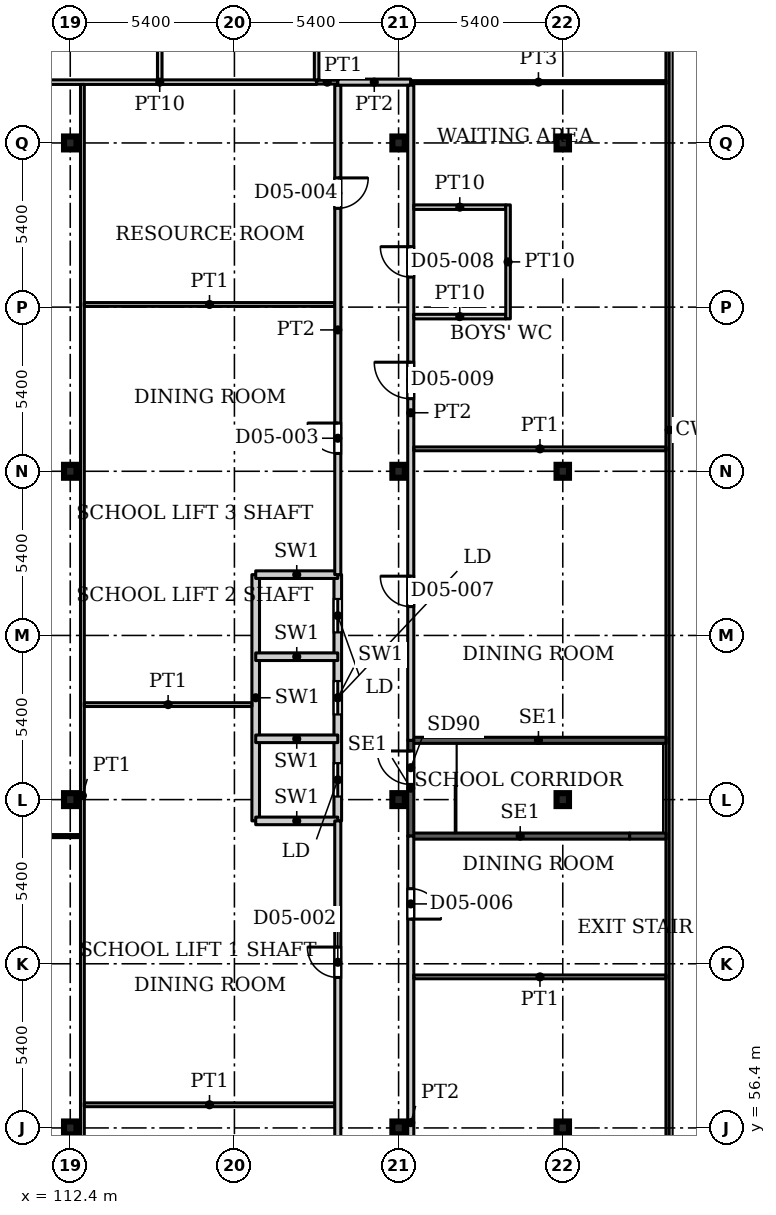
"""IFC4 building model, lengths in metres.
Left out: names, types, materials, properties, quantities, classifications, styles, units other than length and angle.
Written with IfcOpenShell. Run it as: python <this file> out.ifc"""

import sys

from ifc_helpers import new_model, si_unit, direction, frame, frame_2d, origin, origin_2d, place, context, subcontext, project, spatial, rectangle, i_section, extrude, source, transform, mapped, element, fill, save


model = new_model("IFC4")
c1 = context("Model", 3, precision=1e-05, world=origin(), true_north=direction((0.0, 1.0)))
c2 = subcontext(c1, "Body", "Model", "MODEL_VIEW")
j1 = project(units=[si_unit("LENGTHUNIT", "METRE"), si_unit("PLANEANGLEUNIT", "RADIAN")], contexts=[c1])
p1 = place(None, origin())
s1 = spatial("IfcSite", under=j1, at=p1, CompositionType="ELEMENT")
p2 = place(p1, origin())
s2 = spatial("IfcBuilding", under=s1, at=p2, CompositionType="ELEMENT")
p3 = place(p2, frame((0.0, 0.0, 26.0)))
s3 = spatial("IfcBuildingStorey", under=s2, at=p3, CompositionType="ELEMENT", Elevation=26.0)
for number, where, z_axis, x_axis in (
    (1, (112.4, 56.4, 0.0), (0.0, 0.0, 1.0), (1.0, 0.0, 0.0)),
    (2, (123.2, 56.4, 0.0), (0.0, 0.0, 1.0), (1.0, 0.0, 0.0)),
    (3, (128.6, 56.4, 0.0), (0.0, 0.0, 1.0), (1.0, 0.0, 0.0)),
    (4, (112.4, 67.2, 0.0), (0.0, 0.0, 1.0), (1.0, 0.0, 0.0)),
    (5, (123.2, 67.2, 0.0), (0.0, 0.0, 1.0), (1.0, 0.0, 0.0)),
    (6, (128.6, 67.2, 0.0), (0.0, 0.0, 1.0), (1.0, 0.0, 0.0)),
    (7, (112.4, 78.0, 0.0), (0.0, 0.0, 1.0), (1.0, 0.0, 0.0)),
    (8, (123.2, 78.0, 0.0), (0.0, 0.0, 1.0), (1.0, 0.0, 0.0)),
    (9, (128.6, 78.0, 0.0), (0.0, 0.0, 1.0), (1.0, 0.0, 0.0)),
    (10, (112.4, 88.8, 0.0), (0.0, 0.0, 1.0), (1.0, 0.0, 0.0)),
    (11, (123.2, 88.8, 0.0), (0.0, 0.0, 1.0), (1.0, 0.0, 0.0)),
    (12, (128.6, 88.8, 0.0), (0.0, 0.0, 1.0), (1.0, 0.0, 0.0)),
):
    element("IfcColumn", number, at=place(p3, frame(where, z_axis=z_axis, x_axis=x_axis)), inside=s3, PredefinedType="COLUMN", context=c2, shape_type="SweptSolid", body=[
        extrude(i_section(OverallWidth=0.409, OverallDepth=0.425, WebThickness=0.033, FlangeThickness=0.052, FilletRadius=0.013, at=origin_2d()), origin(), (0.0, 0.0, 1.0), 4.5),
    ])
p4 = place(p3, frame((118.5, 66.5, 0.0), z_axis=(0.0, 0.0, 1.0), x_axis=(0.0, 1.0, 0.0)))
e13 = element("IfcWall", 13, at=p4, inside=s3, PredefinedType="PARTITIONING", context=c2, shape_type="SweptSolid", body=[
    extrude(rectangle(XDim=8.1, YDim=0.25, at=frame_2d((4.05, 0.0))), origin(), (0.0, 0.0, 1.0), 4.5),
])
p5 = place(p3, frame((121.2, 66.5, 0.0), z_axis=(0.0, 0.0, 1.0), x_axis=(0.0, 1.0, 0.0)))
e14 = element("IfcWall", 14, at=p5, inside=s3, PredefinedType="PARTITIONING", context=c2, shape_type="SweptSolid", body=[
    extrude(rectangle(XDim=8.1, YDim=0.25, at=frame_2d((4.05, 0.0))), origin(), (0.0, 0.0, 1.0), 4.5),
])
p6 = place(p5, frame((0.8, 0.0, 0.0)))
e15 = element("IfcOpeningElement", 15, at=p6, cuts=e14, PredefinedType="OPENING", context=c2, shape_type="SweptSolid", body=[
    extrude(rectangle(XDim=1.1, YDim=2.2, at=frame_2d((0.55, 1.1))), frame((0.0, 0.135, 0.0), z_axis=(0.0, -1.0, 0.0), x_axis=(1.0, 0.0, 0.0)), (0.0, 0.0, 1.0), 0.27),
])
p7 = place(p5, frame((3.5, 0.0, 0.0)))
e16 = element("IfcOpeningElement", 16, at=p7, cuts=e14, PredefinedType="OPENING", context=c2, shape_type="SweptSolid", body=[
    extrude(rectangle(XDim=1.1, YDim=2.2, at=frame_2d((0.55, 1.1))), frame((0.0, 0.135, 0.0), z_axis=(0.0, -1.0, 0.0), x_axis=(1.0, 0.0, 0.0)), (0.0, 0.0, 1.0), 0.27),
])
p8 = place(p5, frame((6.2, 0.0, 0.0)))
e17 = element("IfcOpeningElement", 17, at=p8, cuts=e14, PredefinedType="OPENING", context=c2, shape_type="SweptSolid", body=[
    extrude(rectangle(XDim=1.1, YDim=2.2, at=frame_2d((0.55, 1.1))), frame((0.0, 0.135, 0.0), z_axis=(0.0, -1.0, 0.0), x_axis=(1.0, 0.0, 0.0)), (0.0, 0.0, 1.0), 0.27),
])
for number, where, z_axis, x_axis in (
    (18, (118.5, 66.5, 0.0), (0.0, 0.0, 1.0), (1.0, 0.0, 0.0)),
    (19, (118.5, 69.2, 0.0), (0.0, 0.0, 1.0), (1.0, 0.0, 0.0)),
    (20, (118.5, 71.9, 0.0), (0.0, 0.0, 1.0), (1.0, 0.0, 0.0)),
    (21, (118.5, 74.6, 0.0), (0.0, 0.0, 1.0), (1.0, 0.0, 0.0)),
):
    element("IfcWall", number, at=place(p3, frame(where, z_axis=z_axis, x_axis=x_axis)), inside=s3, PredefinedType="PARTITIONING", context=c2, shape_type="SweptSolid", body=[
        extrude(rectangle(XDim=2.7, YDim=0.25, at=frame_2d((1.35, 0.0))), origin(), (0.0, 0.0, 1.0), 4.5),
    ])
p9 = place(p3, frame((123.6, 66.0, 0.0), z_axis=(0.0, 0.0, 1.0), x_axis=(1.0, 0.0, 0.0)))
e22 = element("IfcWall", 22, at=p9, inside=s3, PredefinedType="SHEAR", context=c2, shape_type="SweptSolid", body=[
    extrude(rectangle(XDim=7.2, YDim=0.2, at=frame_2d((3.6, 0.0))), origin(), (0.0, 0.0, 1.0), 4.5),
])
p10 = place(p3, frame((130.8, 66.0, 0.0), z_axis=(0.0, 0.0, 1.0), x_axis=(1.0, 0.0, 0.0)))
e23 = element("IfcWall", 23, at=p10, inside=s3, PredefinedType="SHEAR", context=c2, shape_type="SweptSolid", body=[
    extrude(rectangle(XDim=1.2, YDim=0.2, at=frame_2d((0.6, 0.0))), origin(), (0.0, 0.0, 1.0), 4.5),
])
p11 = place(p3, frame((123.6, 69.15, 0.0), z_axis=(0.0, 0.0, 1.0), x_axis=(1.0, 0.0, 0.0)))
e24 = element("IfcWall", 24, at=p11, inside=s3, PredefinedType="SHEAR", context=c2, shape_type="SweptSolid", body=[
    extrude(rectangle(XDim=8.4, YDim=0.2, at=frame_2d((4.2, 0.0))), origin(), (0.0, 0.0, 1.0), 4.5),
])
p12 = place(p3, frame((123.6, 66.0, 0.0), z_axis=(0.0, 0.0, 1.0), x_axis=(0.0, 1.0, 0.0)))
e25 = element("IfcWall", 25, at=p12, inside=s3, PredefinedType="SHEAR", context=c2, shape_type="SweptSolid", body=[
    extrude(rectangle(XDim=3.15, YDim=0.2, at=frame_2d((1.575, 0.0))), origin(), (0.0, 0.0, 1.0), 4.5),
])
p13 = place(p12, frame((1.7, 0.0, 0.0)))
e26 = element("IfcOpeningElement", 26, at=p13, cuts=e25, PredefinedType="OPENING", context=c2, shape_type="SweptSolid", body=[
    extrude(rectangle(XDim=1.1, YDim=2.2, at=frame_2d((0.55, 1.1))), frame((0.0, 0.11, 0.0), z_axis=(0.0, -1.0, 0.0), x_axis=(1.0, 0.0, 0.0)), (0.0, 0.0, 1.0), 0.22),
])
p14 = place(p3, frame((92.7, 66.0, 0.0), z_axis=(0.0, 0.0, 1.0), x_axis=(1.0, 0.0, 0.0)))
e27 = element("IfcWall", 27, at=p14, inside=s3, PredefinedType="PARTITIONING", context=c2, shape_type="SweptSolid", body=[
    extrude(rectangle(XDim=20.038, YDim=0.1, at=frame_2d((10.019, 0.0))), origin(), (0.0, 0.0, 1.0), 4.2),
])
p15 = place(p3, frame((110.183, 90.8, 0.0), z_axis=(0.0, 0.0, 1.0), x_axis=(1.0, 0.0, 0.0)))
e28 = element("IfcWall", 28, at=p15, inside=s3, PredefinedType="PARTITIONING", context=c2, shape_type="SweptSolid", body=[
    extrude(rectangle(XDim=10.321, YDim=0.15, at=frame_2d((5.16, 0.0))), origin(), (0.0, 0.0, 1.0), 4.2),
])
p16 = place(p3, frame((112.8, 43.938, 0.0), z_axis=(0.0, 0.0, 1.0), x_axis=(0.0, 1.0, 0.0)))
e29 = element("IfcWall", 29, at=p16, inside=s3, PredefinedType="PARTITIONING", context=c2, shape_type="SweptSolid", body=[
    extrude(rectangle(XDim=46.787, YDim=0.125, at=frame_2d((23.394, 0.0))), origin(), (0.0, 0.0, 1.0), 4.2),
])
p17 = place(p3, frame((112.862, 57.162, 0.0), z_axis=(0.0, 0.0, 1.0), x_axis=(1.0, 0.0, 0.0)))
e30 = element("IfcWall", 30, at=p17, inside=s3, PredefinedType="PARTITIONING", context=c2, shape_type="SweptSolid", body=[
    extrude(rectangle(XDim=8.238, YDim=0.125, at=frame_2d((4.119, 0.0))), origin(), (0.0, 0.0, 1.0), 4.2),
])
p18 = place(p3, frame((112.862, 70.325, 0.0), z_axis=(0.0, 0.0, 1.0), x_axis=(1.0, 0.0, 0.0)))
e31 = element("IfcWall", 31, at=p18, inside=s3, PredefinedType="PARTITIONING", context=c2, shape_type="SweptSolid", body=[
    extrude(rectangle(XDim=5.514, YDim=0.125, at=frame_2d((2.757, 0.0))), origin(), (0.0, 0.0, 1.0), 4.2),
])
p19 = place(p3, frame((112.862, 83.487, 0.0), z_axis=(0.0, 0.0, 1.0), x_axis=(1.0, 0.0, 0.0)))
e32 = element("IfcWall", 32, at=p19, inside=s3, PredefinedType="PARTITIONING", context=c2, shape_type="SweptSolid", body=[
    extrude(rectangle(XDim=8.238, YDim=0.125, at=frame_2d((4.119, 0.0))), origin(), (0.0, 0.0, 1.0), 4.2),
])
p20 = place(p3, frame((115.344, 90.875, 0.0), z_axis=(0.0, 0.0, 1.0), x_axis=(0.0, 1.0, 0.0)))
e33 = element("IfcWall", 33, at=p20, inside=s3, PredefinedType="PARTITIONING", context=c2, shape_type="SweptSolid", body=[
    extrude(rectangle(XDim=8.225, YDim=0.15, at=frame_2d((4.113, 0.0))), origin(), (0.0, 0.0, 1.0), 4.2),
])
p21 = place(p3, frame((120.504, 90.8, 0.0), z_axis=(0.0, 0.0, 1.0), x_axis=(1.0, 0.0, 0.0)))
e34 = element("IfcWall", 34, at=p21, inside=s3, PredefinedType="PARTITIONING", context=c2, shape_type="SweptSolid", body=[
    extrude(rectangle(XDim=0.696, YDim=0.125, at=frame_2d((0.348, 0.0))), origin(), (0.0, 0.0, 1.0), 4.2),
])
p22 = place(p3, frame((120.504, 90.875, 0.0), z_axis=(0.0, 0.0, 1.0), x_axis=(0.0, 1.0, 0.0)))
e35 = element("IfcWall", 35, at=p22, inside=s3, PredefinedType="PARTITIONING", context=c2, shape_type="SweptSolid", body=[
    extrude(rectangle(XDim=8.225, YDim=0.15, at=frame_2d((4.113, 0.0))), origin(), (0.0, 0.0, 1.0), 4.2),
])
p23 = place(p3, frame((121.2, 43.9, 0.0), z_axis=(0.0, 0.0, 1.0), x_axis=(0.0, 1.0, 0.0)))
e36 = element("IfcWall", 36, at=p23, inside=s3, PredefinedType="PARTITIONING", context=c2, shape_type="SweptSolid", body=[
    extrude(rectangle(XDim=22.6, YDim=0.2, at=frame_2d((11.3, 0.0))), origin(), (0.0, 0.0, 1.0), 4.2),
])
p24 = place(p23, frame((6.112, 0.0, 0.0)))
e37 = element("IfcOpeningElement", 37, at=p24, cuts=e36, PredefinedType="OPENING", context=c2, shape_type="SweptSolid", body=[
    extrude(rectangle(XDim=1.0, YDim=2.1, at=frame_2d((0.5, 1.05))), frame((0.0, 0.11, 0.0), z_axis=(0.0, -1.0, 0.0), x_axis=(1.0, 0.0, 0.0)), (0.0, 0.0, 1.0), 0.22),
])
p25 = place(p23, frame((17.45, 0.0, 0.0)))
e38 = element("IfcOpeningElement", 38, at=p25, cuts=e36, PredefinedType="OPENING", context=c2, shape_type="SweptSolid", body=[
    extrude(rectangle(XDim=1.0, YDim=2.1, at=frame_2d((0.5, 1.05))), frame((0.0, 0.11, 0.0), z_axis=(0.0, -1.0, 0.0), x_axis=(1.0, 0.0, 0.0)), (0.0, 0.0, 1.0), 0.22),
])
p26 = place(p3, frame((121.2, 74.6, 0.0), z_axis=(0.0, 0.0, 1.0), x_axis=(0.0, 1.0, 0.0)))
e39 = element("IfcWall", 39, at=p26, inside=s3, PredefinedType="PARTITIONING", context=c2, shape_type="SweptSolid", body=[
    extrude(rectangle(XDim=16.1, YDim=0.2, at=frame_2d((8.05, 0.0))), origin(), (0.0, 0.0, 1.0), 4.2),
])
p27 = place(p26, frame((3.987, 0.0, 0.0)))
e40 = element("IfcOpeningElement", 40, at=p27, cuts=e39, PredefinedType="OPENING", context=c2, shape_type="SweptSolid", body=[
    extrude(rectangle(XDim=1.0, YDim=2.1, at=frame_2d((0.5, 1.05))), frame((0.0, 0.11, 0.0), z_axis=(0.0, -1.0, 0.0), x_axis=(1.0, 0.0, 0.0)), (0.0, 0.0, 1.0), 0.22),
])
p28 = place(p26, frame((12.05, 0.0, 0.0)))
e41 = element("IfcOpeningElement", 41, at=p28, cuts=e39, PredefinedType="OPENING", context=c2, shape_type="SweptSolid", body=[
    extrude(rectangle(XDim=1.0, YDim=2.1, at=frame_2d((0.5, 1.05))), frame((0.0, 0.11, 0.0), z_axis=(0.0, -1.0, 0.0), x_axis=(1.0, 0.0, 0.0)), (0.0, 0.0, 1.0), 0.22),
])
p29 = place(p3, frame((121.2, 90.8, 0.0), z_axis=(0.0, 0.0, 1.0), x_axis=(1.0, 0.0, 0.0)))
e42 = element("IfcWall", 42, at=p29, inside=s3, PredefinedType="PARTITIONING", context=c2, shape_type="SweptSolid", body=[
    extrude(rectangle(XDim=2.4, YDim=0.2, at=frame_2d((1.2, 0.0))), origin(), (0.0, 0.0, 1.0), 4.2),
])
p30 = place(p3, frame((123.6, 47.15, 0.0), z_axis=(0.0, 0.0, 1.0), x_axis=(0.0, 1.0, 0.0)))
e43 = element("IfcWall", 43, at=p30, inside=s3, PredefinedType="PARTITIONING", context=c2, shape_type="SweptSolid", body=[
    extrude(rectangle(XDim=18.85, YDim=0.2, at=frame_2d((9.425, 0.0))), origin(), (0.0, 0.0, 1.0), 4.2),
])
p31 = place(p30, frame((6.65, 0.0, 0.0)))
e44 = element("IfcOpeningElement", 44, at=p31, cuts=e43, PredefinedType="OPENING", context=c2, shape_type="SweptSolid", body=[
    extrude(rectangle(XDim=1.0, YDim=2.1, at=frame_2d((0.5, 1.05))), frame((0.0, 0.11, 0.0), z_axis=(0.0, -1.0, 0.0), x_axis=(1.0, 0.0, 0.0)), (0.0, 0.0, 1.0), 0.22),
])
p32 = place(p30, frame((16.119, 0.0, 0.0)))
e45 = element("IfcOpeningElement", 45, at=p32, cuts=e43, PredefinedType="OPENING", context=c2, shape_type="SweptSolid", body=[
    extrude(rectangle(XDim=1.0, YDim=2.1, at=frame_2d((0.5, 1.05))), frame((0.0, 0.11, 0.0), z_axis=(0.0, -1.0, 0.0), x_axis=(1.0, 0.0, 0.0)), (0.0, 0.0, 1.0), 0.22),
])
p33 = place(p3, frame((123.6, 69.15, 0.0), z_axis=(0.0, 0.0, 1.0), x_axis=(0.0, 1.0, 0.0)))
e46 = element("IfcWall", 46, at=p33, inside=s3, PredefinedType="PARTITIONING", context=c2, shape_type="SweptSolid", body=[
    extrude(rectangle(XDim=21.55, YDim=0.2, at=frame_2d((10.775, 0.0))), origin(), (0.0, 0.0, 1.0), 4.2),
])
p34 = place(p33, frame((4.4, 0.0, 0.0)))
e47 = element("IfcOpeningElement", 47, at=p34, cuts=e46, PredefinedType="OPENING", context=c2, shape_type="SweptSolid", body=[
    extrude(rectangle(XDim=1.0, YDim=2.1, at=frame_2d((0.5, 1.05))), frame((0.0, 0.11, 0.0), z_axis=(0.0, -1.0, 0.0), x_axis=(1.0, 0.0, 0.0)), (0.0, 0.0, 1.0), 0.22),
])
p35 = place(p33, frame((15.238, 0.0, 0.0)))
e48 = element("IfcOpeningElement", 48, at=p35, cuts=e46, PredefinedType="OPENING", context=c2, shape_type="SweptSolid", body=[
    extrude(rectangle(XDim=1.0, YDim=2.1, at=frame_2d((0.5, 1.05))), frame((0.0, 0.11, 0.0), z_axis=(0.0, -1.0, 0.0), x_axis=(1.0, 0.0, 0.0)), (0.0, 0.0, 1.0), 0.22),
])
p36 = place(p33, frame((11.238, 0.0, 0.0)))
e49 = element("IfcOpeningElement", 49, at=p36, cuts=e46, PredefinedType="OPENING", context=c2, shape_type="SweptSolid", body=[
    extrude(rectangle(XDim=1.2, YDim=2.1, at=frame_2d((0.6, 1.05))), frame((0.0, 0.11, 0.0), z_axis=(0.0, -1.0, 0.0), x_axis=(1.0, 0.0, 0.0)), (0.0, 0.0, 1.0), 0.22),
])
p37 = place(p3, frame((123.6, 90.8, 0.0), z_axis=(0.0, 0.0, 1.0), x_axis=(1.0, 0.0, 0.0)))
e50 = element("IfcWall", 50, at=p37, inside=s3, PredefinedType="PARTITIONING", context=c2, shape_type="SweptSolid", body=[
    extrude(rectangle(XDim=8.4, YDim=0.1, at=frame_2d((4.2, 0.0))), origin(), (0.0, 0.0, 1.0), 4.2),
])
for number, where, z_axis, x_axis in (
    (51, (123.7, 61.369, 0.0), (0.0, 0.0, 1.0), (1.0, 0.0, 0.0)),
    (52, (123.7, 78.738, 0.0), (0.0, 0.0, 1.0), (1.0, 0.0, 0.0)),
):
    element("IfcWall", number, at=place(p3, frame(where, z_axis=z_axis, x_axis=x_axis)), inside=s3, PredefinedType="PARTITIONING", context=c2, shape_type="SweptSolid", body=[
        extrude(rectangle(XDim=8.3, YDim=0.125, at=frame_2d((4.15, 0.0))), origin(), (0.0, 0.0, 1.0), 4.2),
    ])
for number, where, z_axis, x_axis in (
    (53, (123.7, 83.088, 0.0), (0.0, 0.0, 1.0), (1.0, 0.0, 0.0)),
    (54, (123.7, 86.688, 0.0), (0.0, 0.0, 1.0), (1.0, 0.0, 0.0)),
):
    element("IfcWall", number, at=place(p3, frame(where, z_axis=z_axis, x_axis=x_axis)), inside=s3, PredefinedType="PARTITIONING", context=c2, shape_type="SweptSolid", body=[
        extrude(rectangle(XDim=3.025, YDim=0.15, at=frame_2d((1.513, 0.0))), origin(), (0.0, 0.0, 1.0), 4.2),
    ])
p38 = place(p3, frame((126.8, 83.013, 0.0), z_axis=(0.0, 0.0, 1.0), x_axis=(0.0, 1.0, 0.0)))
e55 = element("IfcWall", 55, at=p38, inside=s3, PredefinedType="PARTITIONING", context=c2, shape_type="SweptSolid", body=[
    extrude(rectangle(XDim=3.75, YDim=0.15, at=frame_2d((1.875, 0.0))), origin(), (0.0, 0.0, 1.0), 4.2),
])
m1 = source(origin(), c2, "Body", "SweptSolid", [
    extrude(rectangle(XDim=1.1, YDim=2.2, at=frame_2d((0.55, 1.1))), frame((0.0, 0.025, 0.0), z_axis=(0.0, -1.0, 0.0), x_axis=(1.0, 0.0, 0.0)), (0.0, 0.0, 1.0), 0.05),
])
p39 = place(p6, origin())
e56 = element("IfcDoor", 56, at=p39, inside=s3, OperationType="SLIDING_TO_LEFT", PredefinedType="DOOR", context=c2, shape_type="MappedRepresentation", body=[
    mapped(m1, transform((0.0, 0.0, 0.0), x_axis=(1.0, 0.0, 0.0), y_axis=(0.0, 1.0, 0.0), z_axis=(0.0, 0.0, 1.0), scale=1.0)),
])
fill(e15, e56)
p40 = place(p7, origin())
e57 = element("IfcDoor", 57, at=p40, inside=s3, OperationType="SLIDING_TO_LEFT", PredefinedType="DOOR", context=c2, shape_type="MappedRepresentation", body=[
    mapped(m1, transform((0.0, 0.0, 0.0), x_axis=(1.0, 0.0, 0.0), y_axis=(0.0, 1.0, 0.0), z_axis=(0.0, 0.0, 1.0), scale=1.0)),
])
fill(e16, e57)
p41 = place(p8, origin())
e58 = element("IfcDoor", 58, at=p41, inside=s3, OperationType="SLIDING_TO_LEFT", PredefinedType="DOOR", context=c2, shape_type="MappedRepresentation", body=[
    mapped(m1, transform((0.0, 0.0, 0.0), x_axis=(1.0, 0.0, 0.0), y_axis=(0.0, 1.0, 0.0), z_axis=(0.0, 0.0, 1.0), scale=1.0)),
])
fill(e17, e58)
m2 = source(origin(), c2, "Body", "SweptSolid", [
    extrude(rectangle(XDim=1.1, YDim=2.2, at=frame_2d((0.55, 1.1))), frame((0.0, 0.025, 0.0), z_axis=(0.0, -1.0, 0.0), x_axis=(1.0, 0.0, 0.0)), (0.0, 0.0, 1.0), 0.05),
])
p42 = place(p13, origin())
e59 = element("IfcDoor", 59, at=p42, inside=s3, OperationType="SINGLE_SWING_LEFT", PredefinedType="DOOR", context=c2, shape_type="MappedRepresentation", body=[
    mapped(m2, transform((0.0, 0.0, 0.0), x_axis=(1.0, 0.0, 0.0), y_axis=(0.0, 1.0, 0.0), z_axis=(0.0, 0.0, 1.0), scale=1.0)),
])
fill(e26, e59)
m3 = source(origin(), c2, "Body", "SweptSolid", [
    extrude(rectangle(XDim=1.0, YDim=2.1, at=frame_2d((0.5, 1.05))), frame((0.0, 0.025, 0.0), z_axis=(0.0, -1.0, 0.0), x_axis=(1.0, 0.0, 0.0)), (0.0, 0.0, 1.0), 0.05),
])
p43 = place(p25, origin())
e60 = element("IfcDoor", 60, at=p43, inside=s3, OperationType="SINGLE_SWING_LEFT", PredefinedType="DOOR", context=c2, shape_type="MappedRepresentation", body=[
    mapped(m3, transform((0.0, 0.0, 0.0), x_axis=(1.0, 0.0, 0.0), y_axis=(0.0, 1.0, 0.0), z_axis=(0.0, 0.0, 1.0), scale=1.0)),
])
fill(e38, e60)
p44 = place(p27, origin())
e61 = element("IfcDoor", 61, at=p44, inside=s3, OperationType="SINGLE_SWING_LEFT", PredefinedType="DOOR", context=c2, shape_type="MappedRepresentation", body=[
    mapped(m3, transform((0.0, 0.0, 0.0), x_axis=(1.0, 0.0, 0.0), y_axis=(0.0, 1.0, 0.0), z_axis=(0.0, 0.0, 1.0), scale=1.0)),
])
fill(e40, e61)
p45 = place(p28, origin())
e62 = element("IfcDoor", 62, at=p45, inside=s3, OperationType="SINGLE_SWING_RIGHT", PredefinedType="DOOR", context=c2, shape_type="MappedRepresentation", body=[
    mapped(m3, transform((0.0, 0.0, 0.0), x_axis=(1.0, 0.0, 0.0), y_axis=(0.0, 1.0, 0.0), z_axis=(0.0, 0.0, 1.0), scale=1.0)),
])
fill(e41, e62)
p46 = place(p32, origin())
e63 = element("IfcDoor", 63, at=p46, inside=s3, OperationType="SINGLE_SWING_RIGHT", PredefinedType="DOOR", context=c2, shape_type="MappedRepresentation", body=[
    mapped(m3, transform((0.0, 0.0, 0.0), x_axis=(1.0, 0.0, 0.0), y_axis=(0.0, 1.0, 0.0), z_axis=(0.0, 0.0, 1.0), scale=1.0)),
])
fill(e45, e63)
p47 = place(p34, origin())
e64 = element("IfcDoor", 64, at=p47, inside=s3, OperationType="SINGLE_SWING_LEFT", PredefinedType="DOOR", context=c2, shape_type="MappedRepresentation", body=[
    mapped(m3, transform((0.0, 0.0, 0.0), x_axis=(1.0, 0.0, 0.0), y_axis=(0.0, 1.0, 0.0), z_axis=(0.0, 0.0, 1.0), scale=1.0)),
])
fill(e47, e64)
p48 = place(p35, origin())
e65 = element("IfcDoor", 65, at=p48, inside=s3, OperationType="SINGLE_SWING_LEFT", PredefinedType="DOOR", context=c2, shape_type="MappedRepresentation", body=[
    mapped(m3, transform((0.0, 0.0, 0.0), x_axis=(1.0, 0.0, 0.0), y_axis=(0.0, 1.0, 0.0), z_axis=(0.0, 0.0, 1.0), scale=1.0)),
])
fill(e48, e65)
m4 = source(origin(), c2, "Body", "SweptSolid", [
    extrude(rectangle(XDim=1.2, YDim=2.1, at=frame_2d((0.6, 1.05))), frame((0.0, 0.025, 0.0), z_axis=(0.0, -1.0, 0.0), x_axis=(1.0, 0.0, 0.0)), (0.0, 0.0, 1.0), 0.05),
])
p49 = place(p36, origin())
e66 = element("IfcDoor", 66, at=p49, inside=s3, OperationType="SINGLE_SWING_LEFT", PredefinedType="DOOR", context=c2, shape_type="MappedRepresentation", body=[
    mapped(m4, transform((0.0, 0.0, 0.0), x_axis=(1.0, 0.0, 0.0), y_axis=(0.0, 1.0, 0.0), z_axis=(0.0, 0.0, 1.0), scale=1.0)),
])
fill(e49, e66)
save(model, sys.argv[1])
